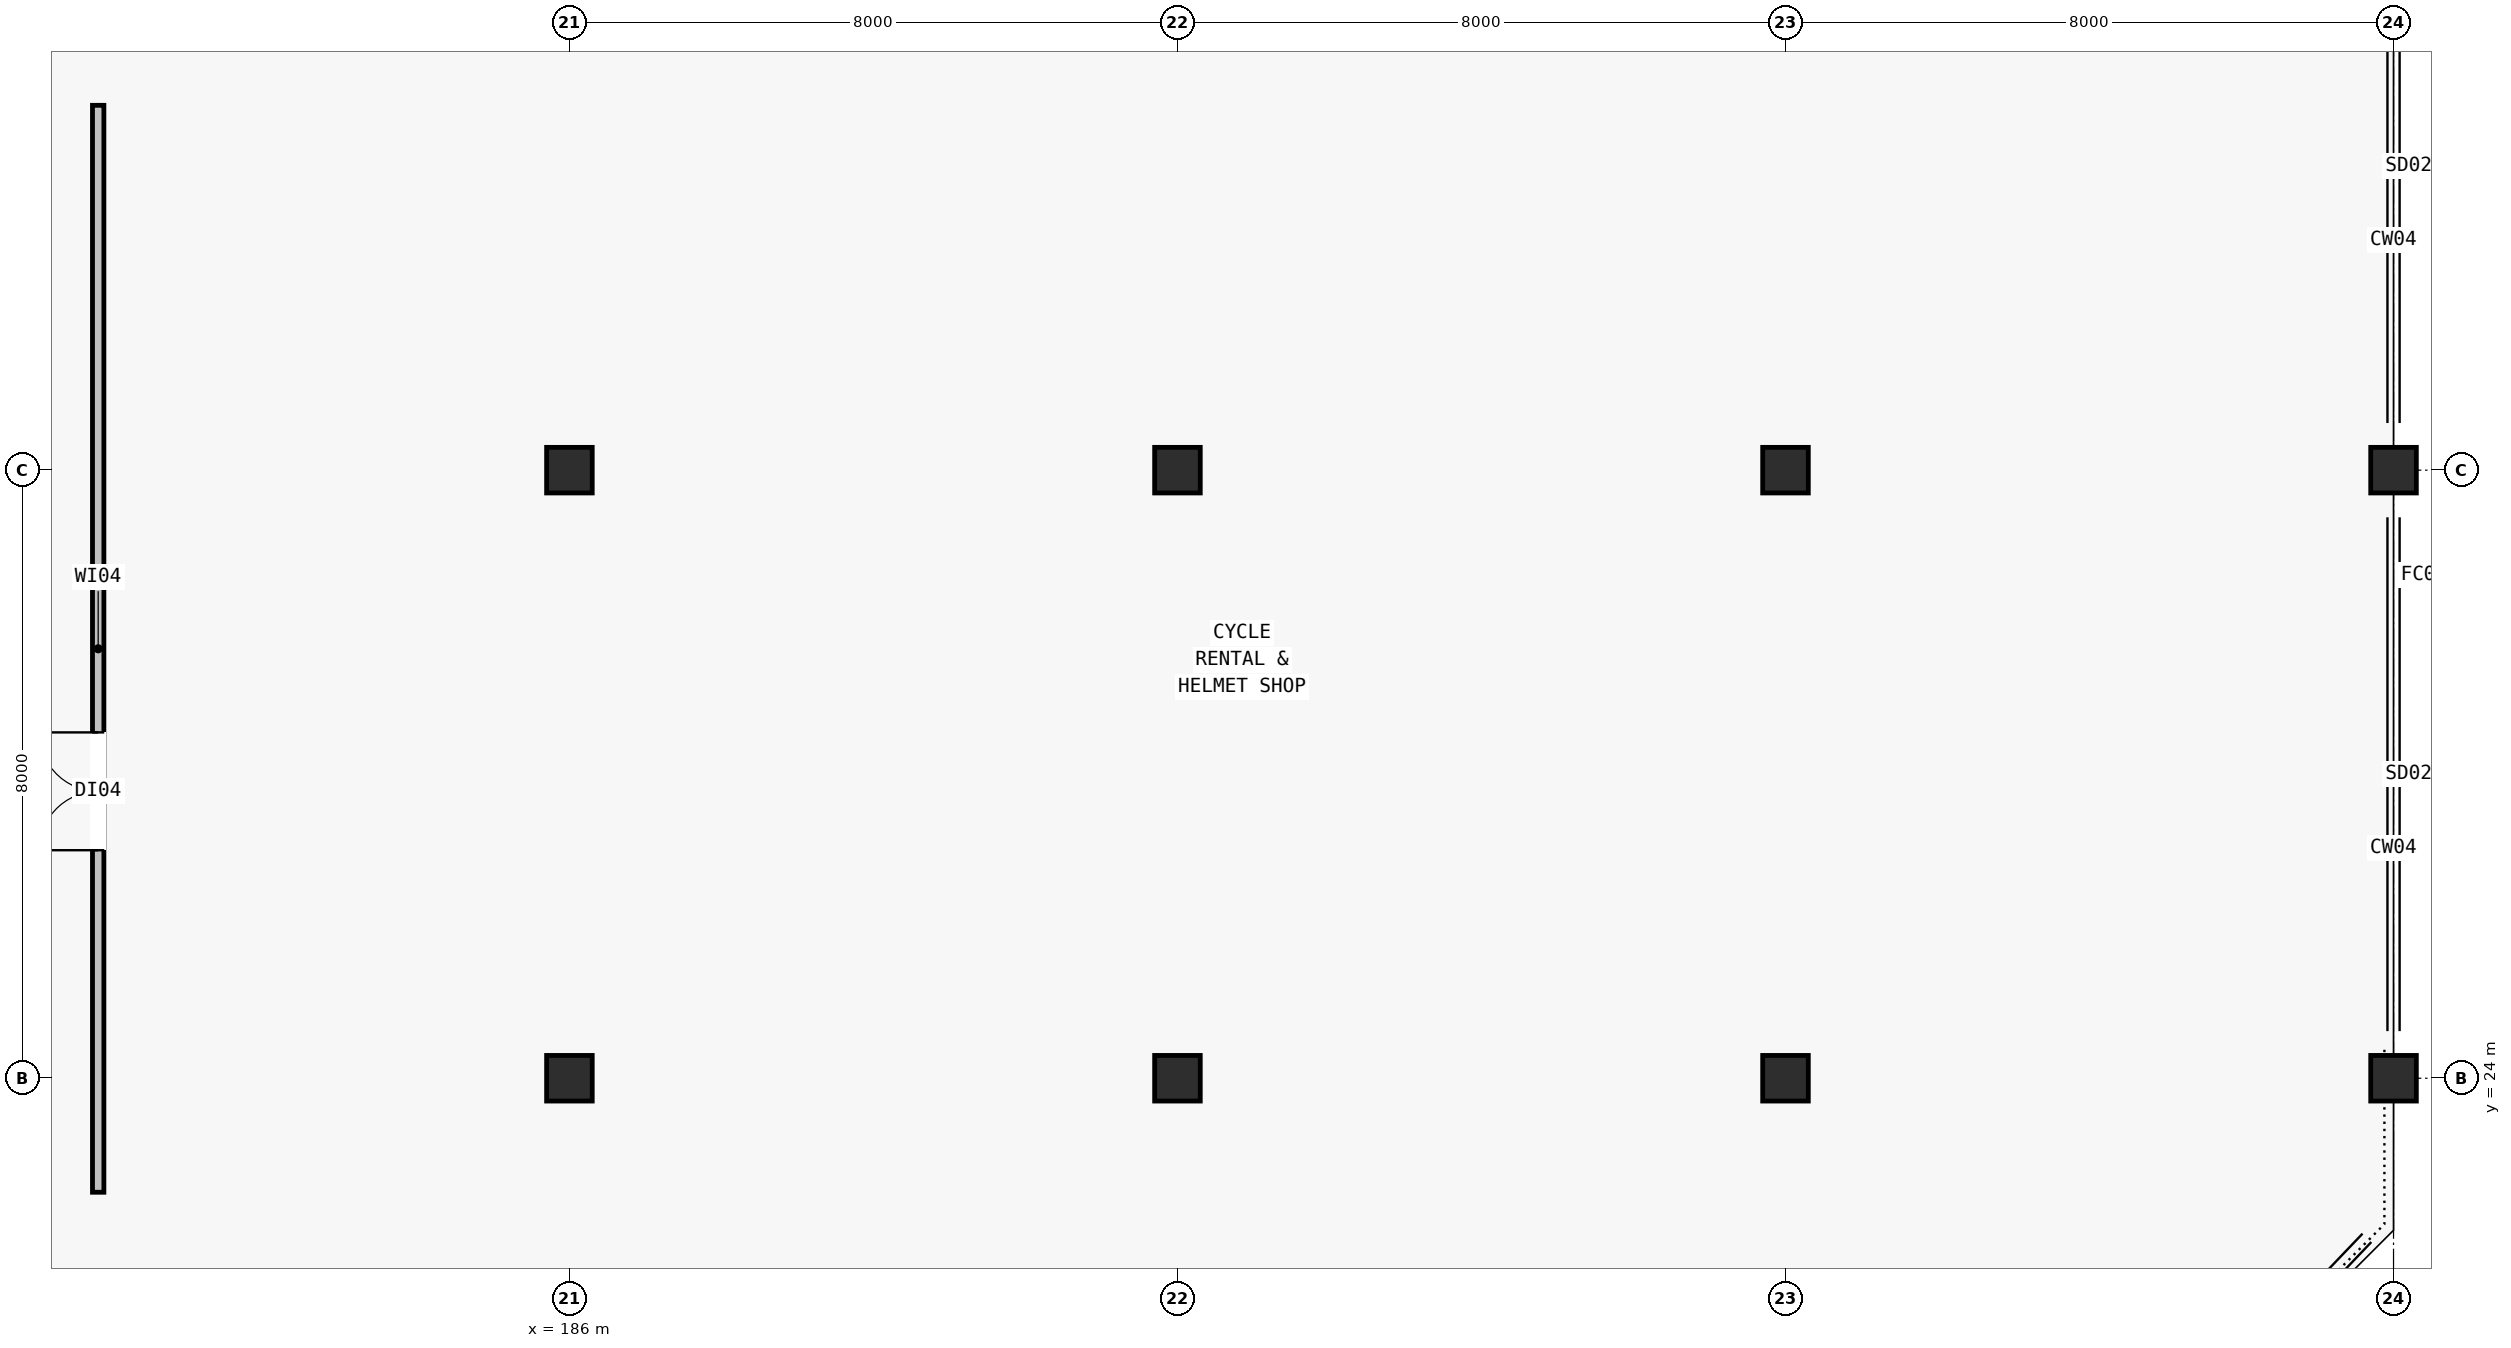
"""IFC4 building model, lengths in metres.
Left out: names, types, materials, properties, quantities, classifications, styles, units other than length and angle.
Written with IfcOpenShell. Run it as: python <this file> out.ifc"""

import sys

from ifc_helpers import new_model, si_unit, direction, frame, frame_2d, origin, origin_2d, place, context, subcontext, project, spatial, rectangle, extrude, element, fill, save


model = new_model("IFC4")
c1 = context("Model", 3, precision=1e-05, world=origin(), true_north=direction((0.0, 1.0)))
c2 = subcontext(c1, "Body", "Model", "MODEL_VIEW")
j1 = project(units=[si_unit("LENGTHUNIT", "METRE"), si_unit("PLANEANGLEUNIT", "RADIAN")], contexts=[c1])
p1 = place(None, origin())
s1 = spatial("IfcSite", under=j1, at=p1, CompositionType="ELEMENT")
p2 = place(p1, origin())
s2 = spatial("IfcBuilding", under=s1, at=p2, CompositionType="ELEMENT")
p3 = place(p2, frame((0.0, 0.0, 5.6)))
s3 = spatial("IfcBuildingStorey", under=s2, at=p3, CompositionType="ELEMENT", Elevation=5.6)
for number, where, z_axis, x_axis in (
    (1, (186.0, 24.0, 0.0), (0.0, 0.0, 1.0), (1.0, 0.0, 0.0)),
    (2, (186.0, 32.0, 0.0), (0.0, 0.0, 1.0), (1.0, 0.0, 0.0)),
    (3, (194.0, 24.0, 0.0), (0.0, 0.0, 1.0), (1.0, 0.0, 0.0)),
    (4, (194.0, 32.0, 0.0), (0.0, 0.0, 1.0), (1.0, 0.0, 0.0)),
    (5, (202.0, 24.0, 0.0), (0.0, 0.0, 1.0), (1.0, 0.0, 0.0)),
    (6, (202.0, 32.0, 0.0), (0.0, 0.0, 1.0), (1.0, 0.0, 0.0)),
    (7, (210.0, 24.0, 0.0), (0.0, 0.0, 1.0), (1.0, 0.0, 0.0)),
    (8, (210.0, 32.0, 0.0), (0.0, 0.0, 1.0), (1.0, 0.0, 0.0)),
):
    element("IfcColumn", number, at=place(p3, frame(where, z_axis=z_axis, x_axis=x_axis)), inside=s3, PredefinedType="COLUMN", context=c2, shape_type="SweptSolid", body=[
        extrude(rectangle(XDim=0.6, YDim=0.6, at=origin_2d()), origin(), (0.0, 0.0, 1.0), 3.9),
    ])
p4 = place(p3, frame((179.8, 22.5, 0.0), z_axis=(0.0, 0.0, 1.0), x_axis=(0.0, 1.0, 0.0)))
e9 = element("IfcWall", 9, at=p4, inside=s3, PredefinedType="PARTITIONING", context=c2, shape_type="SweptSolid", body=[
    extrude(rectangle(XDim=14.3, YDim=0.15, at=frame_2d((7.15, 0.0))), origin(), (0.0, 0.0, 1.0), 2.48),
])
p5 = place(p4, frame((4.5, 0.0, 0.0)))
e10 = element("IfcOpeningElement", 10, at=p5, cuts=e9, PredefinedType="OPENING", context=c2, shape_type="SweptSolid", body=[
    extrude(rectangle(XDim=1.55, YDim=2.2, at=frame_2d((0.775, 1.1))), frame((0.0, 0.085, 0.0), z_axis=(0.0, -1.0, 0.0), x_axis=(1.0, 0.0, 0.0)), (0.0, 0.0, 1.0), 0.17),
])
p6 = place(p5, origin())
e11 = element("IfcDoor", 11, at=p6, inside=s3, OperationType="DOUBLE_SWING_LEFT", PredefinedType="DOOR", context=c2, shape_type="SweptSolid", body=[
    extrude(rectangle(XDim=1.55, YDim=2.2, at=frame_2d((0.775, 1.1))), frame((0.0, 0.025, 0.0), z_axis=(0.0, -1.0, 0.0), x_axis=(1.0, 0.0, 0.0)), (0.0, 0.0, 1.0), 0.05),
])
fill(e10, e11)
save(model, sys.argv[1])
